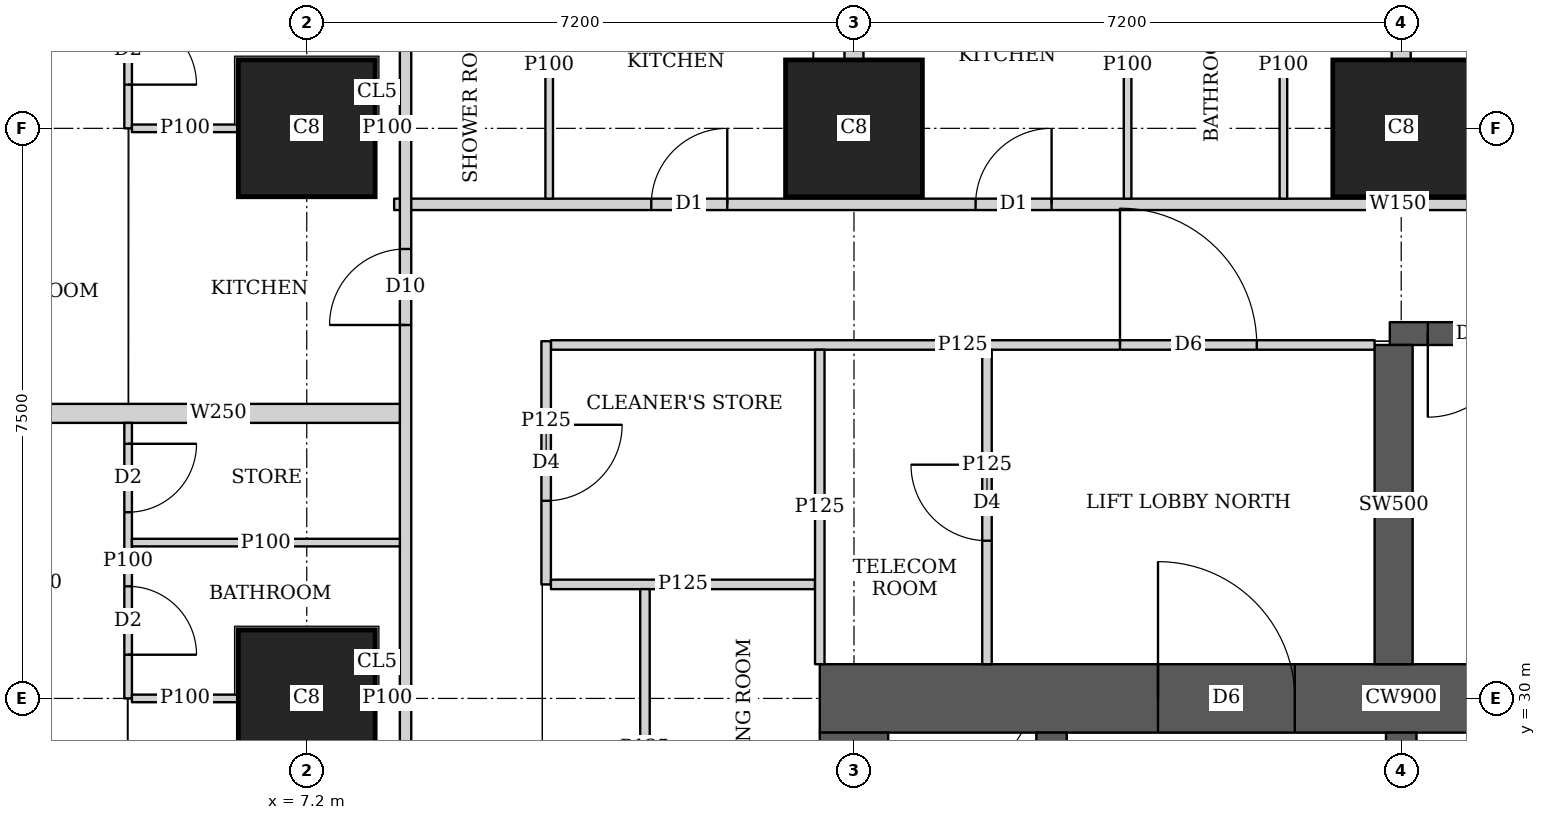
"""IFC4 building model, lengths in metres.
Left out: names, types, materials, properties, quantities, classifications, styles, units other than length and angle.
Written with IfcOpenShell. Run it as: python <this file> out.ifc"""

import sys

from ifc_helpers import new_model, si_unit, direction, frame, frame_2d, origin, origin_2d, place, context, subcontext, project, spatial, rectangle, extrude, element, fill, save


model = new_model("IFC4")
c1 = context("Model", 3, precision=1e-05, world=origin(), true_north=direction((0.0, 1.0)))
c2 = subcontext(c1, "Body", "Model", "MODEL_VIEW")
j1 = project(units=[si_unit("LENGTHUNIT", "METRE"), si_unit("PLANEANGLEUNIT", "RADIAN")], contexts=[c1])
p1 = place(None, origin())
s1 = spatial("IfcSite", under=j1, at=p1, CompositionType="ELEMENT")
p2 = place(p1, origin())
s2 = spatial("IfcBuilding", under=s1, at=p2, CompositionType="ELEMENT")
p3 = place(p2, frame((0.0, 0.0, 23.75)))
s3 = spatial("IfcBuildingStorey", under=s2, at=p3, CompositionType="ELEMENT", Elevation=23.75)
for number, where, z_axis, x_axis in (
    (1, (7.2, 30.0, 0.0), (0.0, 0.0, 1.0), (1.0, 0.0, 0.0)),
    (2, (7.2, 37.5, 0.0), (0.0, 0.0, 1.0), (1.0, 0.0, 0.0)),
    (3, (14.4, 37.5, 0.0), (0.0, 0.0, 1.0), (1.0, 0.0, 0.0)),
    (4, (21.6, 37.5, 0.0), (0.0, 0.0, 1.0), (1.0, 0.0, 0.0)),
):
    element("IfcColumn", number, at=place(p3, frame(where, z_axis=z_axis, x_axis=x_axis)), inside=s3, PredefinedType="COLUMN", context=c2, shape_type="SweptSolid", body=[
        extrude(rectangle(XDim=1.8, YDim=1.8, at=origin_2d()), origin(), (0.0, 0.0, 1.0), 3.75),
    ])
p4 = place(p3, frame((13.95, 30.0, 0.0), z_axis=(0.0, 0.0, 1.0), x_axis=(1.0, 0.0, 0.0)))
e5 = element("IfcWall", 5, at=p4, inside=s3, PredefinedType="SHEAR", context=c2, shape_type="SweptSolid", body=[
    extrude(rectangle(XDim=15.3, YDim=0.9, at=frame_2d((7.65, 0.0))), origin(), (0.0, 0.0, 1.0), 3.75),
])
p5 = place(p4, frame((4.45, 0.0, 0.0)))
e6 = element("IfcOpeningElement", 6, at=p5, cuts=e5, PredefinedType="OPENING", context=c2, shape_type="SweptSolid", body=[
    extrude(rectangle(XDim=1.8, YDim=2.1, at=frame_2d((0.9, 1.05))), frame((0.0, 0.46, 0.0), z_axis=(0.0, -1.0, 0.0), x_axis=(1.0, 0.0, 0.0)), (0.0, 0.0, 1.0), 0.92),
])
p6 = place(p4, frame((10.7, 0.0, 0.0)))
e7 = element("IfcOpeningElement", 7, at=p6, cuts=e5, PredefinedType="OPENING", context=c2, shape_type="SweptSolid", body=[
    extrude(rectangle(XDim=1.1, YDim=2.1, at=frame_2d((0.55, 1.05))), frame((0.0, 0.46, 0.0), z_axis=(0.0, -1.0, 0.0), x_axis=(1.0, 0.0, 0.0)), (0.0, 0.0, 1.0), 0.92),
])
p7 = place(p3, frame((14.4, 15.45, 0.0), z_axis=(0.0, 0.0, 1.0), x_axis=(0.0, 1.0, 0.0)))
e8 = element("IfcWall", 8, at=p7, inside=s3, PredefinedType="SHEAR", context=c2, shape_type="SweptSolid", body=[
    extrude(rectangle(XDim=14.1, YDim=0.9, at=frame_2d((7.05, 0.0))), origin(), (0.0, 0.0, 1.0), 3.75),
])
p8 = place(p3, frame((17.0, 15.45, 0.0), z_axis=(0.0, 0.0, 1.0), x_axis=(0.0, 1.0, 0.0)))
e9 = element("IfcWall", 9, at=p8, inside=s3, PredefinedType="SHEAR", context=c2, shape_type="SweptSolid", body=[
    extrude(rectangle(XDim=14.1, YDim=0.4, at=frame_2d((7.05, 0.0))), origin(), (0.0, 0.0, 1.0), 3.75),
])
p9 = place(p8, frame((0.875, 0.0, 0.0)))
e10 = element("IfcOpeningElement", 10, at=p9, cuts=e9, PredefinedType="OPENING", context=c2, shape_type="SweptSolid", body=[
    extrude(rectangle(XDim=1.1, YDim=2.1, at=frame_2d((0.55, 1.05))), frame((0.0, 0.21, 0.0), z_axis=(0.0, -1.0, 0.0), x_axis=(1.0, 0.0, 0.0)), (0.0, 0.0, 1.0), 0.42),
])
p10 = place(p8, frame((4.625, 0.0, 0.0)))
e11 = element("IfcOpeningElement", 11, at=p10, cuts=e9, PredefinedType="OPENING", context=c2, shape_type="SweptSolid", body=[
    extrude(rectangle(XDim=1.1, YDim=2.1, at=frame_2d((0.55, 1.05))), frame((0.0, 0.21, 0.0), z_axis=(0.0, -1.0, 0.0), x_axis=(1.0, 0.0, 0.0)), (0.0, 0.0, 1.0), 0.42),
])
p11 = place(p8, frame((8.375, 0.0, 0.0)))
e12 = element("IfcOpeningElement", 12, at=p11, cuts=e9, PredefinedType="OPENING", context=c2, shape_type="SweptSolid", body=[
    extrude(rectangle(XDim=1.1, YDim=2.1, at=frame_2d((0.55, 1.05))), frame((0.0, 0.21, 0.0), z_axis=(0.0, -1.0, 0.0), x_axis=(1.0, 0.0, 0.0)), (0.0, 0.0, 1.0), 0.42),
])
p12 = place(p8, frame((12.125, 0.0, 0.0)))
e13 = element("IfcOpeningElement", 13, at=p12, cuts=e9, PredefinedType="OPENING", context=c2, shape_type="SweptSolid", body=[
    extrude(rectangle(XDim=1.1, YDim=2.1, at=frame_2d((0.55, 1.05))), frame((0.0, 0.21, 0.0), z_axis=(0.0, -1.0, 0.0), x_axis=(1.0, 0.0, 0.0)), (0.0, 0.0, 1.0), 0.42),
])
p13 = place(p3, frame((21.6, 15.45, 0.0), z_axis=(0.0, 0.0, 1.0), x_axis=(0.0, 1.0, 0.0)))
e14 = element("IfcWall", 14, at=p13, inside=s3, PredefinedType="SHEAR", context=c2, shape_type="SweptSolid", body=[
    extrude(rectangle(XDim=14.1, YDim=0.4, at=frame_2d((7.05, 0.0))), origin(), (0.0, 0.0, 1.0), 3.75),
])
p14 = place(p3, frame((21.45, 34.8, 0.0), z_axis=(0.0, 0.0, 1.0), x_axis=(1.0, 0.0, 0.0)))
e15 = element("IfcWall", 15, at=p14, inside=s3, PredefinedType="SHEAR", context=c2, shape_type="SweptSolid", body=[
    extrude(rectangle(XDim=7.5, YDim=0.3, at=frame_2d((3.75, 0.0))), origin(), (0.0, 0.0, 1.0), 3.75),
])
p15 = place(p14, frame((0.5, 0.0, 0.0)))
e16 = element("IfcOpeningElement", 16, at=p15, cuts=e15, PredefinedType="OPENING", context=c2, shape_type="SweptSolid", body=[
    extrude(rectangle(XDim=1.1, YDim=2.1, at=frame_2d((0.55, 1.05))), frame((0.0, 0.16, 0.0), z_axis=(0.0, -1.0, 0.0), x_axis=(1.0, 0.0, 0.0)), (0.0, 0.0, 1.0), 0.32),
])
p16 = place(p3, frame((21.5, 30.45, 0.0), z_axis=(0.0, 0.0, 1.0), x_axis=(0.0, 1.0, 0.0)))
e17 = element("IfcWall", 17, at=p16, inside=s3, PredefinedType="SHEAR", context=c2, shape_type="SweptSolid", body=[
    extrude(rectangle(XDim=4.2, YDim=0.5, at=frame_2d((2.1, 0.0))), origin(), (0.0, 0.0, 1.0), 3.75),
])
p17 = place(p3, frame((8.5, 2.626, 0.0), z_axis=(0.0, 0.0, 1.0), x_axis=(0.0, 1.0, 0.0)))
e18 = element("IfcWall", 18, at=p17, inside=s3, PredefinedType="SOLIDWALL", context=c2, shape_type="SweptSolid", body=[
    extrude(rectangle(XDim=39.773, YDim=0.15, at=frame_2d((19.886, 0.0))), origin(), (0.0, 0.0, 1.0), 2.05),
])
p18 = place(p17, frame((9.786, 0.0, 0.0)))
e19 = element("IfcOpeningElement", 19, at=p18, cuts=e18, PredefinedType="OPENING", context=c2, shape_type="SweptSolid", body=[
    extrude(rectangle(XDim=1.0, YDim=2.0, at=frame_2d((0.5, 1.0))), frame((0.0, 0.085, 0.0), z_axis=(0.0, -1.0, 0.0), x_axis=(1.0, 0.0, 0.0)), (0.0, 0.0, 1.0), 0.17),
])
p19 = place(p17, frame((13.961, 0.0, 0.0)))
e20 = element("IfcOpeningElement", 20, at=p19, cuts=e18, PredefinedType="OPENING", context=c2, shape_type="SweptSolid", body=[
    extrude(rectangle(XDim=1.0, YDim=2.0, at=frame_2d((0.5, 1.0))), frame((0.0, 0.085, 0.0), z_axis=(0.0, -1.0, 0.0), x_axis=(1.0, 0.0, 0.0)), (0.0, 0.0, 1.0), 0.17),
])
p20 = place(p17, frame((24.787, 0.0, 0.0)))
e21 = element("IfcOpeningElement", 21, at=p20, cuts=e18, PredefinedType="OPENING", context=c2, shape_type="SweptSolid", body=[
    extrude(rectangle(XDim=1.0, YDim=2.0, at=frame_2d((0.5, 1.0))), frame((0.0, 0.085, 0.0), z_axis=(0.0, -1.0, 0.0), x_axis=(1.0, 0.0, 0.0)), (0.0, 0.0, 1.0), 0.17),
])
p21 = place(p17, frame((32.287, 0.0, 0.0)))
e22 = element("IfcOpeningElement", 22, at=p21, cuts=e18, PredefinedType="OPENING", context=c2, shape_type="SweptSolid", body=[
    extrude(rectangle(XDim=1.0, YDim=2.0, at=frame_2d((0.5, 1.0))), frame((0.0, 0.085, 0.0), z_axis=(0.0, -1.0, 0.0), x_axis=(1.0, 0.0, 0.0)), (0.0, 0.0, 1.0), 0.17),
])
p22 = place(p3, frame((8.35, 36.5, 0.0), z_axis=(0.0, 0.0, 1.0), x_axis=(1.0, 0.0, 0.0)))
e23 = element("IfcWall", 23, at=p22, inside=s3, PredefinedType="SOLIDWALL", context=c2, shape_type="SweptSolid", body=[
    extrude(rectangle(XDim=26.415, YDim=0.15, at=frame_2d((13.208, 0.0))), origin(), (0.0, 0.0, 1.0), 3.5),
])
p23 = place(p22, frame((3.383, 0.0, 0.0)))
e24 = element("IfcOpeningElement", 24, at=p23, cuts=e23, PredefinedType="OPENING", context=c2, shape_type="SweptSolid", body=[
    extrude(rectangle(XDim=1.0, YDim=2.1, at=frame_2d((0.5, 1.05))), frame((0.0, 0.085, 0.0), z_axis=(0.0, -1.0, 0.0), x_axis=(1.0, 0.0, 0.0)), (0.0, 0.0, 1.0), 0.17),
])
p24 = place(p22, frame((7.65, 0.0, 0.0)))
e25 = element("IfcOpeningElement", 25, at=p24, cuts=e23, PredefinedType="OPENING", context=c2, shape_type="SweptSolid", body=[
    extrude(rectangle(XDim=1.0, YDim=2.1, at=frame_2d((0.5, 1.05))), frame((0.0, 0.085, 0.0), z_axis=(0.0, -1.0, 0.0), x_axis=(1.0, 0.0, 0.0)), (0.0, 0.0, 1.0), 0.17),
])
p25 = place(p22, frame((14.857, 0.0, 0.0)))
e26 = element("IfcOpeningElement", 26, at=p25, cuts=e23, PredefinedType="OPENING", context=c2, shape_type="SweptSolid", body=[
    extrude(rectangle(XDim=1.0, YDim=2.1, at=frame_2d((0.5, 1.05))), frame((0.0, 0.085, 0.0), z_axis=(0.0, -1.0, 0.0), x_axis=(1.0, 0.0, 0.0)), (0.0, 0.0, 1.0), 0.17),
])
p26 = place(p3, frame((4.85, 30.0, 0.0), z_axis=(0.0, 0.0, 1.0), x_axis=(0.0, 1.0, 0.0)))
e27 = element("IfcWall", 27, at=p26, inside=s3, PredefinedType="PARTITIONING", context=c2, shape_type="SweptSolid", body=[
    extrude(rectangle(XDim=3.625, YDim=0.1, at=frame_2d((1.812, 0.0))), origin(), (0.0, 0.0, 1.0), 3.5),
])
p27 = place(p26, frame((0.575, 0.0, 0.0)))
e28 = element("IfcOpeningElement", 28, at=p27, cuts=e27, PredefinedType="OPENING", context=c2, shape_type="SweptSolid", body=[
    extrude(rectangle(XDim=0.9, YDim=2.1, at=frame_2d((0.45, 1.05))), frame((0.0, 0.06, 0.0), z_axis=(0.0, -1.0, 0.0), x_axis=(1.0, 0.0, 0.0)), (0.0, 0.0, 1.0), 0.12),
])
p28 = place(p26, frame((2.45, 0.0, 0.0)))
e29 = element("IfcOpeningElement", 29, at=p28, cuts=e27, PredefinedType="OPENING", context=c2, shape_type="SweptSolid", body=[
    extrude(rectangle(XDim=0.9, YDim=2.1, at=frame_2d((0.45, 1.05))), frame((0.0, 0.06, 0.0), z_axis=(0.0, -1.0, 0.0), x_axis=(1.0, 0.0, 0.0)), (0.0, 0.0, 1.0), 0.12),
])
p29 = place(p3, frame((4.9, 30.0, 0.0), z_axis=(0.0, 0.0, 1.0), x_axis=(1.0, 0.0, 0.0)))
e30 = element("IfcWall", 30, at=p29, inside=s3, PredefinedType="PARTITIONING", context=c2, shape_type="SweptSolid", body=[
    extrude(rectangle(XDim=1.399, YDim=0.1, at=frame_2d((0.7, 0.0))), origin(), (0.0, 0.0, 1.0), 3.5),
])
p30 = place(p3, frame((8.101, 30.0, 0.0), z_axis=(0.0, 0.0, 1.0), x_axis=(1.0, 0.0, 0.0)))
e31 = element("IfcWall", 31, at=p30, inside=s3, PredefinedType="PARTITIONING", context=c2, shape_type="SweptSolid", body=[
    extrude(rectangle(XDim=0.324, YDim=0.1, at=frame_2d((0.162, 0.0))), origin(), (0.0, 0.0, 1.0), 3.5),
])
p31 = place(p3, frame((4.9, 32.05, 0.0), z_axis=(0.0, 0.0, 1.0), x_axis=(1.0, 0.0, 0.0)))
e32 = element("IfcWall", 32, at=p31, inside=s3, PredefinedType="PARTITIONING", context=c2, shape_type="SweptSolid", body=[
    extrude(rectangle(XDim=3.525, YDim=0.1, at=frame_2d((1.763, 0.0))), origin(), (0.0, 0.0, 1.0), 3.5),
])
p32 = place(p3, frame((4.85, 37.5, 0.0), z_axis=(0.0, 0.0, 1.0), x_axis=(0.0, 1.0, 0.0)))
e33 = element("IfcWall", 33, at=p32, inside=s3, PredefinedType="PARTITIONING", context=c2, shape_type="SweptSolid", body=[
    extrude(rectangle(XDim=5.213, YDim=0.1, at=frame_2d((2.606, 0.0))), origin(), (0.0, 0.0, 1.0), 3.5),
])
p33 = place(p32, frame((0.575, 0.0, 0.0)))
e34 = element("IfcOpeningElement", 34, at=p33, cuts=e33, PredefinedType="OPENING", context=c2, shape_type="SweptSolid", body=[
    extrude(rectangle(XDim=0.9, YDim=2.1, at=frame_2d((0.45, 1.05))), frame((0.0, 0.06, 0.0), z_axis=(0.0, -1.0, 0.0), x_axis=(1.0, 0.0, 0.0)), (0.0, 0.0, 1.0), 0.12),
])
p34 = place(p32, frame((2.85, 0.0, 0.0)))
e35 = element("IfcOpeningElement", 35, at=p34, cuts=e33, PredefinedType="OPENING", context=c2, shape_type="SweptSolid", body=[
    extrude(rectangle(XDim=0.9, YDim=2.1, at=frame_2d((0.45, 1.05))), frame((0.0, 0.06, 0.0), z_axis=(0.0, -1.0, 0.0), x_axis=(1.0, 0.0, 0.0)), (0.0, 0.0, 1.0), 0.12),
])
p35 = place(p3, frame((4.9, 37.5, 0.0), z_axis=(0.0, 0.0, 1.0), x_axis=(1.0, 0.0, 0.0)))
e36 = element("IfcWall", 36, at=p35, inside=s3, PredefinedType="PARTITIONING", context=c2, shape_type="SweptSolid", body=[
    extrude(rectangle(XDim=1.399, YDim=0.1, at=frame_2d((0.7, 0.0))), origin(), (0.0, 0.0, 1.0), 3.5),
])
p36 = place(p3, frame((8.101, 37.5, 0.0), z_axis=(0.0, 0.0, 1.0), x_axis=(1.0, 0.0, 0.0)))
e37 = element("IfcWall", 37, at=p36, inside=s3, PredefinedType="PARTITIONING", context=c2, shape_type="SweptSolid", body=[
    extrude(rectangle(XDim=0.324, YDim=0.1, at=frame_2d((0.162, 0.0))), origin(), (0.0, 0.0, 1.0), 3.5),
])
p37 = place(p3, frame((3.65, 33.75, 0.0), z_axis=(0.0, 0.0, 1.0), x_axis=(1.0, 0.0, 0.0)))
e38 = element("IfcWall", 38, at=p37, inside=s3, PredefinedType="SOLIDWALL", context=c2, shape_type="SweptSolid", body=[
    extrude(rectangle(XDim=4.775, YDim=0.25, at=frame_2d((2.388, 0.0))), origin(), (0.0, 0.0, 1.0), 3.5),
])
for number, where, z_axis, x_axis in (
    (39, (10.39, 36.575, 0.0), (0.0, 0.0, 1.0), (0.0, 1.0, 0.0)),
    (40, (18.0, 36.575, 0.0), (0.0, 0.0, 1.0), (0.0, 1.0, 0.0)),
    (41, (20.05, 36.575, 0.0), (0.0, 0.0, 1.0), (0.0, 1.0, 0.0)),
):
    element("IfcWall", number, at=place(p3, frame(where, z_axis=z_axis, x_axis=x_axis)), inside=s3, PredefinedType="PARTITIONING", context=c2, shape_type="SweptSolid", body=[
        extrude(rectangle(XDim=3.525, YDim=0.1, at=frame_2d((1.763, 0.0))), origin(), (0.0, 0.0, 1.0), 3.5),
    ])
for number, where, z_axis, x_axis in (
    (42, (14.4, 38.401, 0.0), (0.0, 0.0, 1.0), (0.0, 1.0, 0.0)),
    (43, (21.6, 38.401, 0.0), (0.0, 0.0, 1.0), (0.0, 1.0, 0.0)),
):
    element("IfcWall", number, at=place(p3, frame(where, z_axis=z_axis, x_axis=x_axis)), inside=s3, PredefinedType="SOLIDWALL", context=c2, shape_type="SweptSolid", body=[
        extrude(rectangle(XDim=2.949, YDim=0.25, at=frame_2d((1.475, 0.0))), origin(), (0.0, 0.0, 1.0), 3.5),
    ])
p38 = place(p3, frame((10.35, 31.5, 0.0), z_axis=(0.0, 0.0, 1.0), x_axis=(0.0, 1.0, 0.0)))
e44 = element("IfcWall", 44, at=p38, inside=s3, PredefinedType="PARTITIONING", context=c2, shape_type="SweptSolid", body=[
    extrude(rectangle(XDim=3.2, YDim=0.125, at=frame_2d((1.6, 0.0))), origin(), (0.0, 0.0, 1.0), 3.5),
])
p39 = place(p38, frame((1.1, 0.0, 0.0)))
e45 = element("IfcOpeningElement", 45, at=p39, cuts=e44, PredefinedType="OPENING", context=c2, shape_type="SweptSolid", body=[
    extrude(rectangle(XDim=1.0, YDim=2.1, at=frame_2d((0.5, 1.05))), frame((0.0, 0.073, 0.0), z_axis=(0.0, -1.0, 0.0), x_axis=(1.0, 0.0, 0.0)), (0.0, 0.0, 1.0), 0.145),
])
p40 = place(p3, frame((11.65, 26.163, 0.0), z_axis=(0.0, 0.0, 1.0), x_axis=(0.0, 1.0, 0.0)))
e46 = element("IfcWall", 46, at=p40, inside=s3, PredefinedType="PARTITIONING", context=c2, shape_type="SweptSolid", body=[
    extrude(rectangle(XDim=5.275, YDim=0.125, at=frame_2d((2.637, 0.0))), origin(), (0.0, 0.0, 1.0), 3.5),
])
p41 = place(p40, frame((2.137, 0.0, 0.0)))
e47 = element("IfcOpeningElement", 47, at=p41, cuts=e46, PredefinedType="OPENING", context=c2, shape_type="SweptSolid", body=[
    extrude(rectangle(XDim=1.0, YDim=2.1, at=frame_2d((0.5, 1.05))), frame((0.0, 0.073, 0.0), z_axis=(0.0, -1.0, 0.0), x_axis=(1.0, 0.0, 0.0)), (0.0, 0.0, 1.0), 0.145),
])
p42 = place(p3, frame((10.413, 31.5, 0.0), z_axis=(0.0, 0.0, 1.0), x_axis=(1.0, 0.0, 0.0)))
e48 = element("IfcWall", 48, at=p42, inside=s3, PredefinedType="PARTITIONING", context=c2, shape_type="SweptSolid", body=[
    extrude(rectangle(XDim=3.475, YDim=0.125, at=frame_2d((1.737, 0.0))), origin(), (0.0, 0.0, 1.0), 3.5),
])
p43 = place(p3, frame((13.95, 30.45, 0.0), z_axis=(0.0, 0.0, 1.0), x_axis=(0.0, 1.0, 0.0)))
e49 = element("IfcWall", 49, at=p43, inside=s3, PredefinedType="PARTITIONING", context=c2, shape_type="SweptSolid", body=[
    extrude(rectangle(XDim=4.137, YDim=0.125, at=frame_2d((2.068, 0.0))), origin(), (0.0, 0.0, 1.0), 3.5),
])
p44 = place(p3, frame((10.413, 34.65, 0.0), z_axis=(0.0, 0.0, 1.0), x_axis=(1.0, 0.0, 0.0)))
e50 = element("IfcWall", 50, at=p44, inside=s3, PredefinedType="PARTITIONING", context=c2, shape_type="SweptSolid", body=[
    extrude(rectangle(XDim=10.837, YDim=0.125, at=frame_2d((5.418, 0.0))), origin(), (0.0, 0.0, 1.0), 3.5),
])
p45 = place(p44, frame((7.487, 0.0, 0.0)))
e51 = element("IfcOpeningElement", 51, at=p45, cuts=e50, PredefinedType="OPENING", context=c2, shape_type="SweptSolid", body=[
    extrude(rectangle(XDim=1.8, YDim=2.1, at=frame_2d((0.9, 1.05))), frame((0.0, 0.073, 0.0), z_axis=(0.0, -1.0, 0.0), x_axis=(1.0, 0.0, 0.0)), (0.0, 0.0, 1.0), 0.145),
])
p46 = place(p3, frame((16.15, 30.45, 0.0), z_axis=(0.0, 0.0, 1.0), x_axis=(0.0, 1.0, 0.0)))
e52 = element("IfcWall", 52, at=p46, inside=s3, PredefinedType="PARTITIONING", context=c2, shape_type="SweptSolid", body=[
    extrude(rectangle(XDim=4.137, YDim=0.125, at=frame_2d((2.068, 0.0))), origin(), (0.0, 0.0, 1.0), 3.5),
])
p47 = place(p46, frame((1.625, 0.0, 0.0)))
e53 = element("IfcOpeningElement", 53, at=p47, cuts=e52, PredefinedType="OPENING", context=c2, shape_type="SweptSolid", body=[
    extrude(rectangle(XDim=1.0, YDim=2.1, at=frame_2d((0.5, 1.05))), frame((0.0, 0.073, 0.0), z_axis=(0.0, -1.0, 0.0), x_axis=(1.0, 0.0, 0.0)), (0.0, 0.0, 1.0), 0.145),
])
p48 = place(p27, origin())
e54 = element("IfcDoor", 54, at=p48, inside=s3, OperationType="SINGLE_SWING_RIGHT", PredefinedType="DOOR", context=c2, shape_type="SweptSolid", body=[
    extrude(rectangle(XDim=0.9, YDim=2.1, at=frame_2d((0.45, 1.05))), frame((0.0, 0.025, 0.0), z_axis=(0.0, -1.0, 0.0), x_axis=(1.0, 0.0, 0.0)), (0.0, 0.0, 1.0), 0.05),
])
fill(e28, e54)
p49 = place(p28, origin())
e55 = element("IfcDoor", 55, at=p49, inside=s3, OperationType="SINGLE_SWING_LEFT", PredefinedType="DOOR", context=c2, shape_type="SweptSolid", body=[
    extrude(rectangle(XDim=0.9, YDim=2.1, at=frame_2d((0.45, 1.05))), frame((0.0, 0.025, 0.0), z_axis=(0.0, -1.0, 0.0), x_axis=(1.0, 0.0, 0.0)), (0.0, 0.0, 1.0), 0.05),
])
fill(e29, e55)
p50 = place(p33, origin())
e56 = element("IfcDoor", 56, at=p50, inside=s3, OperationType="SINGLE_SWING_RIGHT", PredefinedType="DOOR", context=c2, shape_type="SweptSolid", body=[
    extrude(rectangle(XDim=0.9, YDim=2.1, at=frame_2d((0.45, 1.05))), frame((0.0, 0.025, 0.0), z_axis=(0.0, -1.0, 0.0), x_axis=(1.0, 0.0, 0.0)), (0.0, 0.0, 1.0), 0.05),
])
fill(e34, e56)
p51 = place(p21, origin())
e57 = element("IfcDoor", 57, at=p51, inside=s3, OperationType="SINGLE_SWING_LEFT", PredefinedType="DOOR", context=c2, shape_type="SweptSolid", body=[
    extrude(rectangle(XDim=1.0, YDim=2.0, at=frame_2d((0.5, 1.0))), frame((0.0, 0.025, 0.0), z_axis=(0.0, -1.0, 0.0), x_axis=(1.0, 0.0, 0.0)), (0.0, 0.0, 1.0), 0.05),
])
fill(e22, e57)
p52 = place(p23, origin())
e58 = element("IfcDoor", 58, at=p52, inside=s3, OperationType="SINGLE_SWING_RIGHT", PredefinedType="DOOR", context=c2, shape_type="SweptSolid", body=[
    extrude(rectangle(XDim=1.0, YDim=2.1, at=frame_2d((0.5, 1.05))), frame((0.0, 0.025, 0.0), z_axis=(0.0, -1.0, 0.0), x_axis=(1.0, 0.0, 0.0)), (0.0, 0.0, 1.0), 0.05),
])
fill(e24, e58)
p53 = place(p24, origin())
e59 = element("IfcDoor", 59, at=p53, inside=s3, OperationType="SINGLE_SWING_RIGHT", PredefinedType="DOOR", context=c2, shape_type="SweptSolid", body=[
    extrude(rectangle(XDim=1.0, YDim=2.1, at=frame_2d((0.5, 1.05))), frame((0.0, 0.025, 0.0), z_axis=(0.0, -1.0, 0.0), x_axis=(1.0, 0.0, 0.0)), (0.0, 0.0, 1.0), 0.05),
])
fill(e25, e59)
p54 = place(p39, origin())
e60 = element("IfcDoor", 60, at=p54, inside=s3, OperationType="SINGLE_SWING_LEFT", PredefinedType="DOOR", context=c2, shape_type="SweptSolid", body=[
    extrude(rectangle(XDim=1.0, YDim=2.1, at=frame_2d((0.5, 1.05))), frame((0.0, 0.025, 0.0), z_axis=(0.0, -1.0, 0.0), x_axis=(1.0, 0.0, 0.0)), (0.0, 0.0, 1.0), 0.05),
])
fill(e45, e60)
p55 = place(p47, origin())
e61 = element("IfcDoor", 61, at=p55, inside=s3, OperationType="SINGLE_SWING_RIGHT", PredefinedType="DOOR", context=c2, shape_type="SweptSolid", body=[
    extrude(rectangle(XDim=1.0, YDim=2.1, at=frame_2d((0.5, 1.05))), frame((0.0, 0.025, 0.0), z_axis=(0.0, -1.0, 0.0), x_axis=(1.0, 0.0, 0.0)), (0.0, 0.0, 1.0), 0.05),
])
fill(e53, e61)
p56 = place(p45, origin())
e62 = element("IfcDoor", 62, at=p56, inside=s3, OperationType="DOUBLE_DOOR_SINGLE_SWING", PredefinedType="DOOR", context=c2, shape_type="SweptSolid", body=[
    extrude(rectangle(XDim=1.8, YDim=2.1, at=frame_2d((0.9, 1.05))), frame((0.0, 0.025, 0.0), z_axis=(0.0, -1.0, 0.0), x_axis=(1.0, 0.0, 0.0)), (0.0, 0.0, 1.0), 0.05),
])
fill(e51, e62)
p57 = place(p5, origin())
e63 = element("IfcDoor", 63, at=p57, inside=s3, OperationType="DOUBLE_DOOR_SINGLE_SWING", PredefinedType="DOOR", context=c2, shape_type="SweptSolid", body=[
    extrude(rectangle(XDim=1.8, YDim=2.1, at=frame_2d((0.9, 1.05))), frame((0.0, 0.025, 0.0), z_axis=(0.0, -1.0, 0.0), x_axis=(1.0, 0.0, 0.0)), (0.0, 0.0, 1.0), 0.05),
])
fill(e6, e63)
p58 = place(p15, origin())
e64 = element("IfcDoor", 64, at=p58, inside=s3, OperationType="SINGLE_SWING_RIGHT", PredefinedType="DOOR", context=c2, shape_type="SweptSolid", body=[
    extrude(rectangle(XDim=1.1, YDim=2.1, at=frame_2d((0.55, 1.05))), frame((0.0, 0.025, 0.0), z_axis=(0.0, -1.0, 0.0), x_axis=(1.0, 0.0, 0.0)), (0.0, 0.0, 1.0), 0.05),
])
fill(e16, e64)
save(model, sys.argv[1])
